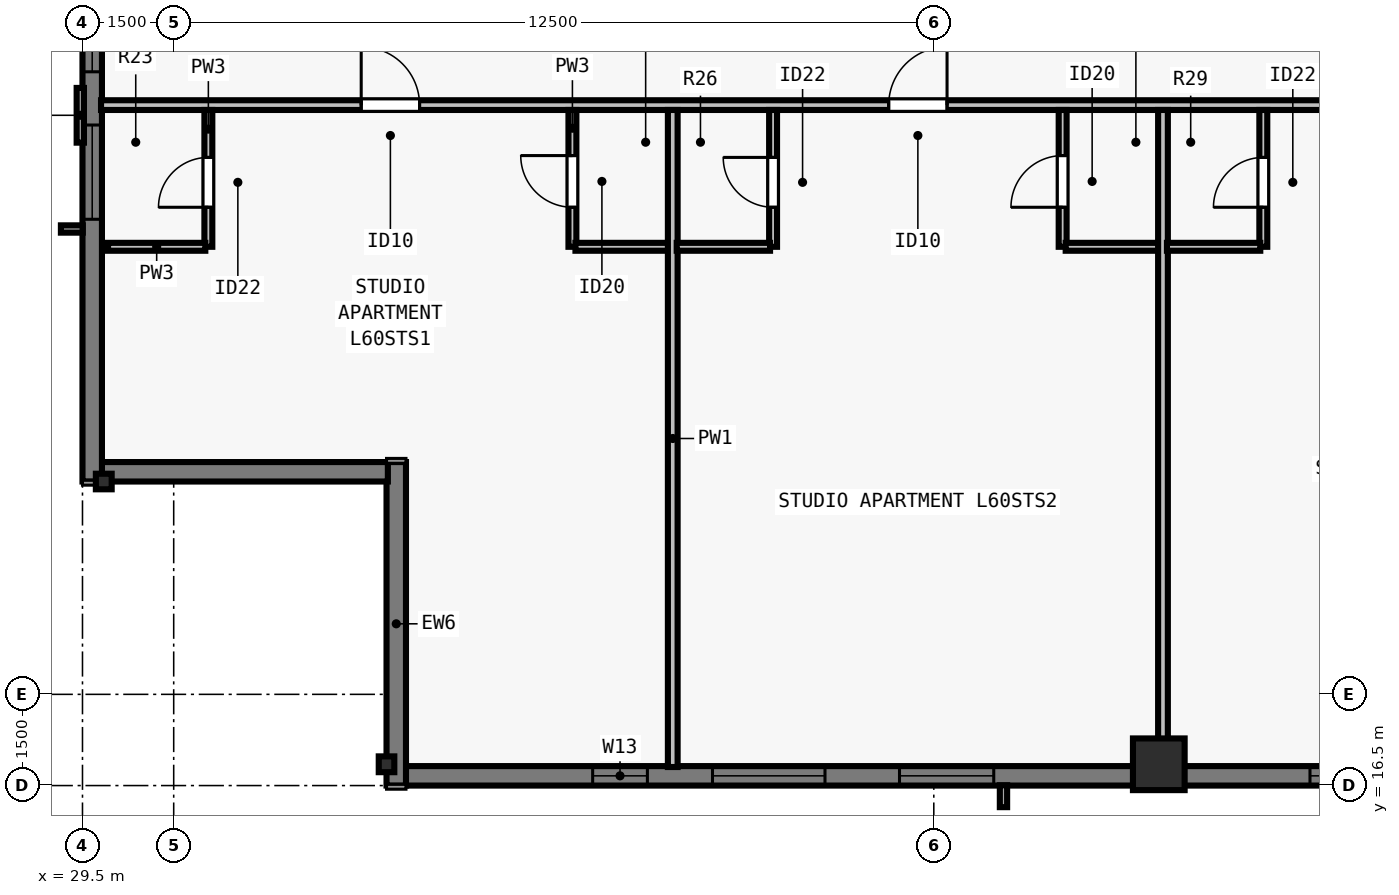
"""IFC4 building model, lengths in metres.
Left out: names, types, materials, properties, quantities, classifications, styles, units other than length and angle.
Written with IfcOpenShell. Run it as: python <this file> out.ifc"""

import sys

from ifc_helpers import new_model, si_unit, direction, frame, frame_2d, origin, origin_2d, place, context, subcontext, project, spatial, rectangle, i_section, extrude, element, fill, save


model = new_model("IFC4")
c1 = context("Model", 3, precision=1e-05, world=origin(), true_north=direction((0.0, 1.0)))
c2 = subcontext(c1, "Body", "Model", "MODEL_VIEW")
j1 = project(units=[si_unit("LENGTHUNIT", "METRE"), si_unit("PLANEANGLEUNIT", "RADIAN")], contexts=[c1])
p1 = place(None, origin())
s1 = spatial("IfcSite", under=j1, at=p1, CompositionType="ELEMENT")
p2 = place(p1, origin())
s2 = spatial("IfcBuilding", under=s1, at=p2, CompositionType="ELEMENT")
p3 = place(p2, frame((0.0, 0.0, 220.0)))
s3 = spatial("IfcBuildingStorey", under=s2, at=p3, CompositionType="ELEMENT", Elevation=220.0)
p4 = place(p3, frame((34.5, 16.85, 0.0), z_axis=(0.0, 0.0, 1.0), x_axis=(1.0, 0.0, 0.0)))
e1 = element("IfcColumn", 1, at=p4, inside=s3, PredefinedType="COLUMN", context=c2, shape_type="SweptSolid", body=[
    extrude(i_section(OverallWidth=0.256, OverallDepth=0.26, WebThickness=0.01, FlangeThickness=0.017, FilletRadius=0.013, at=origin_2d()), origin(), (0.0, 0.0, 1.0), 3.5),
])
p5 = place(p3, frame((47.2, 16.85, 0.0), z_axis=(0.0, 0.0, 1.0), x_axis=(1.0, 0.0, 0.0)))
e2 = element("IfcColumn", 2, at=p5, inside=s3, PredefinedType="COLUMN", context=c2, shape_type="SweptSolid", body=[
    extrude(rectangle(XDim=0.85, YDim=0.85, at=origin_2d()), origin(), (0.0, 0.0, 1.0), 3.5),
])
p6 = place(p3, frame((29.85, 21.5, 0.0), z_axis=(0.0, 0.0, 1.0), x_axis=(0.0, 1.0, 0.0)))
e3 = element("IfcColumn", 3, at=p6, inside=s3, PredefinedType="COLUMN", context=c2, shape_type="SweptSolid", body=[
    extrude(i_section(OverallWidth=0.256, OverallDepth=0.26, WebThickness=0.01, FlangeThickness=0.017, FilletRadius=0.013, at=origin_2d()), origin(), (0.0, 0.0, 1.0), 3.5),
])
p7 = place(p3, frame((69.5, 16.66, 0.0), z_axis=(0.0, 0.0, 1.0), x_axis=(-1.0, 0.0, 0.0)))
e4 = element("IfcWall", 4, at=p7, inside=s3, PredefinedType="SOLIDWALL", context=c2, shape_type="SweptSolid", body=[
    extrude(rectangle(XDim=34.702, YDim=0.32, at=frame_2d((17.351, 0.0))), origin(), (0.0, 0.0, 1.0), 3.29),
])
p8 = place(p7, frame((5.213, 0.0, 0.8)))
e5 = element("IfcOpeningElement", 5, at=p8, cuts=e4, PredefinedType="OPENING", context=c2, shape_type="SweptSolid", body=[
    extrude(rectangle(XDim=1.55, YDim=1.678, at=frame_2d((0.775, 0.839))), frame((0.0, 0.17, 0.0), z_axis=(0.0, -1.0, 0.0), x_axis=(1.0, 0.0, 0.0)), (0.0, 0.0, 1.0), 0.34),
])
p9 = place(p7, frame((7.988, 0.0, 0.8)))
e6 = element("IfcOpeningElement", 6, at=p9, cuts=e4, PredefinedType="OPENING", context=c2, shape_type="SweptSolid", body=[
    extrude(rectangle(XDim=1.85, YDim=1.678, at=frame_2d((0.925, 0.839))), frame((0.0, 0.17, 0.0), z_axis=(0.0, -1.0, 0.0), x_axis=(1.0, 0.0, 0.0)), (0.0, 0.0, 1.0), 0.34),
])
p10 = place(p7, frame((10.263, 0.0, 0.8)))
e7 = element("IfcOpeningElement", 7, at=p10, cuts=e4, PredefinedType="OPENING", context=c2, shape_type="SweptSolid", body=[
    extrude(rectangle(XDim=1.55, YDim=1.678, at=frame_2d((0.775, 0.839))), frame((0.0, 0.17, 0.0), z_axis=(0.0, -1.0, 0.0), x_axis=(1.0, 0.0, 0.0)), (0.0, 0.0, 1.0), 0.34),
])
p11 = place(p7, frame((14.738, 0.0, 0.8)))
e8 = element("IfcOpeningElement", 8, at=p11, cuts=e4, PredefinedType="OPENING", context=c2, shape_type="SweptSolid", body=[
    extrude(rectangle(XDim=1.85, YDim=1.678, at=frame_2d((0.925, 0.839))), frame((0.0, 0.17, 0.0), z_axis=(0.0, -1.0, 0.0), x_axis=(1.0, 0.0, 0.0)), (0.0, 0.0, 1.0), 0.34),
])
p12 = place(p7, frame((18.264, 0.0, 0.8)))
e9 = element("IfcOpeningElement", 9, at=p12, cuts=e4, PredefinedType="OPENING", context=c2, shape_type="SweptSolid", body=[
    extrude(rectangle(XDim=1.55, YDim=1.678, at=frame_2d((0.775, 0.839))), frame((0.0, 0.17, 0.0), z_axis=(0.0, -1.0, 0.0), x_axis=(1.0, 0.0, 0.0)), (0.0, 0.0, 1.0), 0.34),
])
p13 = place(p7, frame((25.014, 0.0, 0.8)))
e10 = element("IfcOpeningElement", 10, at=p13, cuts=e4, PredefinedType="OPENING", context=c2, shape_type="SweptSolid", body=[
    extrude(rectangle(XDim=1.55, YDim=1.678, at=frame_2d((0.775, 0.839))), frame((0.0, 0.17, 0.0), z_axis=(0.0, -1.0, 0.0), x_axis=(1.0, 0.0, 0.0)), (0.0, 0.0, 1.0), 0.34),
])
p14 = place(p7, frame((27.789, 0.0, 0.8)))
e11 = element("IfcOpeningElement", 11, at=p14, cuts=e4, PredefinedType="OPENING", context=c2, shape_type="SweptSolid", body=[
    extrude(rectangle(XDim=1.85, YDim=1.678, at=frame_2d((0.925, 0.839))), frame((0.0, 0.17, 0.0), z_axis=(0.0, -1.0, 0.0), x_axis=(1.0, 0.0, 0.0)), (0.0, 0.0, 1.0), 0.34),
])
p15 = place(p7, frame((30.71, 0.0, 0.8)))
e12 = element("IfcOpeningElement", 12, at=p15, cuts=e4, PredefinedType="OPENING", context=c2, shape_type="SweptSolid", body=[
    extrude(rectangle(XDim=0.9, YDim=1.678, at=frame_2d((0.45, 0.839))), frame((0.0, 0.17, 0.0), z_axis=(0.0, -1.0, 0.0), x_axis=(1.0, 0.0, 0.0)), (0.0, 0.0, 1.0), 0.34),
])
p16 = place(p3, frame((34.66, 16.5, 0.0), z_axis=(0.0, 0.0, 1.0), x_axis=(0.0, 1.0, 0.0)))
e13 = element("IfcWall", 13, at=p16, inside=s3, PredefinedType="SOLIDWALL", context=c2, shape_type="SweptSolid", body=[
    extrude(rectangle(XDim=5.32, YDim=0.32, at=frame_2d((2.66, 0.0))), origin(), (0.0, 0.0, 1.0), 3.29),
])
p17 = place(p3, frame((34.522, 21.66, 0.0), z_axis=(0.0, 0.0, 1.0), x_axis=(-1.0, 0.0, 0.0)))
e14 = element("IfcWall", 14, at=p17, inside=s3, PredefinedType="SOLIDWALL", context=c2, shape_type="SweptSolid", body=[
    extrude(rectangle(XDim=4.724, YDim=0.32, at=frame_2d((2.362, 0.0))), origin(), (0.0, 0.0, 1.0), 3.29),
])
p18 = place(p3, frame((29.66, 21.5, 0.0), z_axis=(0.0, 0.0, 1.0), x_axis=(0.0, 1.0, 0.0)))
e15 = element("IfcWall", 15, at=p18, inside=s3, PredefinedType="SOLIDWALL", context=c2, shape_type="SweptSolid", body=[
    extrude(rectangle(XDim=34.702, YDim=0.32, at=frame_2d((17.351, 0.0))), origin(), (0.0, 0.0, 1.0), 3.29),
])
p19 = place(p18, frame((4.312, 0.0, 0.8)))
e16 = element("IfcOpeningElement", 16, at=p19, cuts=e15, PredefinedType="OPENING", context=c2, shape_type="SweptSolid", body=[
    extrude(rectangle(XDim=1.55, YDim=1.678, at=frame_2d((0.775, 0.839))), frame((0.0, 0.17, 0.0), z_axis=(0.0, -1.0, 0.0), x_axis=(1.0, 0.0, 0.0)), (0.0, 0.0, 1.0), 0.34),
])
p20 = place(p18, frame((6.738, 0.0, 0.8)))
e17 = element("IfcOpeningElement", 17, at=p20, cuts=e15, PredefinedType="OPENING", context=c2, shape_type="SweptSolid", body=[
    extrude(rectangle(XDim=1.85, YDim=1.678, at=frame_2d((0.925, 0.839))), frame((0.0, 0.17, 0.0), z_axis=(0.0, -1.0, 0.0), x_axis=(1.0, 0.0, 0.0)), (0.0, 0.0, 1.0), 0.34),
])
p21 = place(p18, frame((10.263, 0.0, 0.8)))
e18 = element("IfcOpeningElement", 18, at=p21, cuts=e15, PredefinedType="OPENING", context=c2, shape_type="SweptSolid", body=[
    extrude(rectangle(XDim=1.55, YDim=1.678, at=frame_2d((0.775, 0.839))), frame((0.0, 0.17, 0.0), z_axis=(0.0, -1.0, 0.0), x_axis=(1.0, 0.0, 0.0)), (0.0, 0.0, 1.0), 0.34),
])
p22 = place(p18, frame((14.738, 0.0, 0.8)))
e19 = element("IfcOpeningElement", 19, at=p22, cuts=e15, PredefinedType="OPENING", context=c2, shape_type="SweptSolid", body=[
    extrude(rectangle(XDim=1.85, YDim=1.678, at=frame_2d((0.925, 0.839))), frame((0.0, 0.17, 0.0), z_axis=(0.0, -1.0, 0.0), x_axis=(1.0, 0.0, 0.0)), (0.0, 0.0, 1.0), 0.34),
])
p23 = place(p18, frame((18.264, 0.0, 0.8)))
e20 = element("IfcOpeningElement", 20, at=p23, cuts=e15, PredefinedType="OPENING", context=c2, shape_type="SweptSolid", body=[
    extrude(rectangle(XDim=1.55, YDim=1.678, at=frame_2d((0.775, 0.839))), frame((0.0, 0.17, 0.0), z_axis=(0.0, -1.0, 0.0), x_axis=(1.0, 0.0, 0.0)), (0.0, 0.0, 1.0), 0.34),
])
p24 = place(p18, frame((24.164, 0.0, 0.8)))
e21 = element("IfcOpeningElement", 21, at=p24, cuts=e15, PredefinedType="OPENING", context=c2, shape_type="SweptSolid", body=[
    extrude(rectangle(XDim=1.55, YDim=1.678, at=frame_2d((0.775, 0.839))), frame((0.0, 0.17, 0.0), z_axis=(0.0, -1.0, 0.0), x_axis=(1.0, 0.0, 0.0)), (0.0, 0.0, 1.0), 0.34),
])
p25 = place(p3, frame((29.805, 27.69, 0.0), z_axis=(0.0, 0.0, 1.0), x_axis=(1.0, 0.0, 0.0)))
e22 = element("IfcWall", 22, at=p25, inside=s3, PredefinedType="PARTITIONING", context=c2, shape_type="SweptSolid", body=[
    extrude(rectangle(XDim=44.39, YDim=0.16, at=frame_2d((22.195, 0.0))), origin(), (0.0, 0.0, 1.0), 2.958),
])
p26 = place(p25, frame((4.279, 0.0, 0.0)))
e23 = element("IfcOpeningElement", 23, at=p26, cuts=e22, PredefinedType="OPENING", context=c2, shape_type="SweptSolid", body=[
    extrude(rectangle(XDim=0.96, YDim=2.18, at=frame_2d((0.48, 1.09))), frame((0.0, 0.09, 0.0), z_axis=(0.0, -1.0, 0.0), x_axis=(1.0, 0.0, 0.0)), (0.0, 0.0, 1.0), 0.18),
])
p27 = place(p25, frame((12.953, 0.0, 0.0)))
e24 = element("IfcOpeningElement", 24, at=p27, cuts=e22, PredefinedType="OPENING", context=c2, shape_type="SweptSolid", body=[
    extrude(rectangle(XDim=0.96, YDim=2.18, at=frame_2d((0.48, 1.09))), frame((0.0, 0.09, 0.0), z_axis=(0.0, -1.0, 0.0), x_axis=(1.0, 0.0, 0.0)), (0.0, 0.0, 1.0), 0.18),
])
p28 = place(p25, frame((21.785, 0.0, 0.0)))
e25 = element("IfcOpeningElement", 25, at=p28, cuts=e22, PredefinedType="OPENING", context=c2, shape_type="SweptSolid", body=[
    extrude(rectangle(XDim=0.96, YDim=2.18, at=frame_2d((0.48, 1.09))), frame((0.0, 0.09, 0.0), z_axis=(0.0, -1.0, 0.0), x_axis=(1.0, 0.0, 0.0)), (0.0, 0.0, 1.0), 0.18),
])
p29 = place(p25, frame((30.617, 0.0, 0.0)))
e26 = element("IfcOpeningElement", 26, at=p29, cuts=e22, PredefinedType="OPENING", context=c2, shape_type="SweptSolid", body=[
    extrude(rectangle(XDim=0.96, YDim=2.18, at=frame_2d((0.48, 1.09))), frame((0.0, 0.09, 0.0), z_axis=(0.0, -1.0, 0.0), x_axis=(1.0, 0.0, 0.0)), (0.0, 0.0, 1.0), 0.18),
])
p30 = place(p25, frame((39.221, 0.0, 0.0)))
e27 = element("IfcOpeningElement", 27, at=p30, cuts=e22, PredefinedType="OPENING", context=c2, shape_type="SweptSolid", body=[
    extrude(rectangle(XDim=0.96, YDim=2.18, at=frame_2d((0.48, 1.09))), frame((0.0, 0.09, 0.0), z_axis=(0.0, -1.0, 0.0), x_axis=(1.0, 0.0, 0.0)), (0.0, 0.0, 1.0), 0.18),
])
p31 = place(p3, frame((31.57, 25.36, 0.0), z_axis=(0.0, 0.0, 1.0), x_axis=(0.0, 1.0, 0.0)))
e28 = element("IfcWall", 28, at=p31, inside=s3, PredefinedType="PLUMBINGWALL", context=c2, shape_type="SweptSolid", body=[
    extrude(rectangle(XDim=2.25, YDim=0.13, at=frame_2d((1.125, 0.0))), origin(), (0.0, 0.0, 1.0), 3.29),
])
p32 = place(p31, frame((0.65, 0.0, 0.0)))
e29 = element("IfcOpeningElement", 29, at=p32, cuts=e28, PredefinedType="OPENING", context=c2, shape_type="SweptSolid", body=[
    extrude(rectangle(XDim=0.82, YDim=2.1, at=frame_2d((0.41, 1.05))), frame((0.0, 0.075, 0.0), z_axis=(0.0, -1.0, 0.0), x_axis=(1.0, 0.0, 0.0)), (0.0, 0.0, 1.0), 0.15),
])
p33 = place(p3, frame((29.92, 25.36, 0.0), z_axis=(0.0, 0.0, 1.0), x_axis=(1.0, 0.0, 0.0)))
e30 = element("IfcWall", 30, at=p33, inside=s3, PredefinedType="PLUMBINGWALL", context=c2, shape_type="SweptSolid", body=[
    extrude(rectangle(XDim=1.6, YDim=0.13, at=frame_2d((0.8, 0.0))), origin(), (0.0, 0.0, 1.0), 3.29),
])
p34 = place(p3, frame((37.557, 25.36, 0.0), z_axis=(0.0, 0.0, 1.0), x_axis=(0.0, 1.0, 0.0)))
e31 = element("IfcWall", 31, at=p34, inside=s3, PredefinedType="PLUMBINGWALL", context=c2, shape_type="SweptSolid", body=[
    extrude(rectangle(XDim=2.25, YDim=0.13, at=frame_2d((1.125, 0.0))), origin(), (0.0, 0.0, 1.0), 3.29),
])
p35 = place(p34, frame((0.65, 0.0, 0.0)))
e32 = element("IfcOpeningElement", 32, at=p35, cuts=e31, PredefinedType="OPENING", context=c2, shape_type="SweptSolid", body=[
    extrude(rectangle(XDim=0.85, YDim=2.1, at=frame_2d((0.425, 1.05))), frame((0.0, 0.075, 0.0), z_axis=(0.0, -1.0, 0.0), x_axis=(1.0, 0.0, 0.0)), (0.0, 0.0, 1.0), 0.15),
])
p36 = place(p3, frame((37.607, 25.36, 0.0), z_axis=(0.0, 0.0, 1.0), x_axis=(1.0, 0.0, 0.0)))
e33 = element("IfcWall", 33, at=p36, inside=s3, PredefinedType="PLUMBINGWALL", context=c2, shape_type="SweptSolid", body=[
    extrude(rectangle(XDim=1.6, YDim=0.13, at=frame_2d((0.8, 0.0))), origin(), (0.0, 0.0, 1.0), 3.29),
])
p37 = place(p3, frame((39.207, 16.805, 0.0), z_axis=(0.0, 0.0, 1.0), x_axis=(0.0, 1.0, 0.0)))
e34 = element("IfcWall", 34, at=p37, inside=s3, PredefinedType="PARTITIONING", context=c2, shape_type="SweptSolid", body=[
    extrude(rectangle(XDim=10.805, YDim=0.16, at=frame_2d((5.403, 0.0))), origin(), (0.0, 0.0, 1.0), 2.573),
])
p38 = place(p3, frame((40.857, 25.36, 0.0), z_axis=(0.0, 0.0, 1.0), x_axis=(0.0, 1.0, 0.0)))
e35 = element("IfcWall", 35, at=p38, inside=s3, PredefinedType="PLUMBINGWALL", context=c2, shape_type="SweptSolid", body=[
    extrude(rectangle(XDim=2.25, YDim=0.13, at=frame_2d((1.125, 0.0))), origin(), (0.0, 0.0, 1.0), 2.573),
])
p39 = place(p38, frame((0.65, 0.0, 0.0)))
e36 = element("IfcOpeningElement", 36, at=p39, cuts=e35, PredefinedType="OPENING", context=c2, shape_type="SweptSolid", body=[
    extrude(rectangle(XDim=0.82, YDim=2.1, at=frame_2d((0.41, 1.05))), frame((0.0, 0.075, 0.0), z_axis=(0.0, -1.0, 0.0), x_axis=(1.0, 0.0, 0.0)), (0.0, 0.0, 1.0), 0.15),
])
p40 = place(p3, frame((39.272, 25.36, 0.0), z_axis=(0.0, 0.0, 1.0), x_axis=(1.0, 0.0, 0.0)))
e37 = element("IfcWall", 37, at=p40, inside=s3, PredefinedType="PLUMBINGWALL", context=c2, shape_type="SweptSolid", body=[
    extrude(rectangle(XDim=1.535, YDim=0.13, at=frame_2d((0.768, 0.0))), origin(), (0.0, 0.0, 1.0), 3.29),
])
p41 = place(p3, frame((45.619, 25.36, 0.0), z_axis=(0.0, 0.0, 1.0), x_axis=(0.0, 1.0, 0.0)))
e38 = element("IfcWall", 38, at=p41, inside=s3, PredefinedType="PLUMBINGWALL", context=c2, shape_type="SweptSolid", body=[
    extrude(rectangle(XDim=2.25, YDim=0.13, at=frame_2d((1.125, 0.0))), origin(), (0.0, 0.0, 1.0), 3.29),
])
p42 = place(p41, frame((0.65, 0.0, 0.0)))
e39 = element("IfcOpeningElement", 39, at=p42, cuts=e38, PredefinedType="OPENING", context=c2, shape_type="SweptSolid", body=[
    extrude(rectangle(XDim=0.85, YDim=2.1, at=frame_2d((0.425, 1.05))), frame((0.0, 0.075, 0.0), z_axis=(0.0, -1.0, 0.0), x_axis=(1.0, 0.0, 0.0)), (0.0, 0.0, 1.0), 0.15),
])
p43 = place(p3, frame((45.669, 25.36, 0.0), z_axis=(0.0, 0.0, 1.0), x_axis=(1.0, 0.0, 0.0)))
e40 = element("IfcWall", 40, at=p43, inside=s3, PredefinedType="PLUMBINGWALL", context=c2, shape_type="SweptSolid", body=[
    extrude(rectangle(XDim=1.6, YDim=0.13, at=frame_2d((0.8, 0.0))), origin(), (0.0, 0.0, 1.0), 3.29),
])
p44 = place(p3, frame((47.269, 16.805, 0.0), z_axis=(0.0, 0.0, 1.0), x_axis=(0.0, 1.0, 0.0)))
e41 = element("IfcWall", 41, at=p44, inside=s3, PredefinedType="PARTITIONING", context=c2, shape_type="SweptSolid", body=[
    extrude(rectangle(XDim=10.805, YDim=0.16, at=frame_2d((5.403, 0.0))), origin(), (0.0, 0.0, 1.0), 2.573),
])
p45 = place(p3, frame((48.919, 25.36, 0.0), z_axis=(0.0, 0.0, 1.0), x_axis=(0.0, 1.0, 0.0)))
e42 = element("IfcWall", 42, at=p45, inside=s3, PredefinedType="PLUMBINGWALL", context=c2, shape_type="SweptSolid", body=[
    extrude(rectangle(XDim=2.25, YDim=0.13, at=frame_2d((1.125, 0.0))), origin(), (0.0, 0.0, 1.0), 3.29),
])
p46 = place(p45, frame((0.65, 0.0, 0.0)))
e43 = element("IfcOpeningElement", 43, at=p46, cuts=e42, PredefinedType="OPENING", context=c2, shape_type="SweptSolid", body=[
    extrude(rectangle(XDim=0.82, YDim=2.1, at=frame_2d((0.41, 1.05))), frame((0.0, 0.075, 0.0), z_axis=(0.0, -1.0, 0.0), x_axis=(1.0, 0.0, 0.0)), (0.0, 0.0, 1.0), 0.15),
])
p47 = place(p3, frame((47.334, 25.36, 0.0), z_axis=(0.0, 0.0, 1.0), x_axis=(1.0, 0.0, 0.0)))
e44 = element("IfcWall", 44, at=p47, inside=s3, PredefinedType="PLUMBINGWALL", context=c2, shape_type="SweptSolid", body=[
    extrude(rectangle(XDim=1.535, YDim=0.13, at=frame_2d((0.768, 0.0))), origin(), (0.0, 0.0, 1.0), 3.29),
])
p48 = place(p12, origin())
e45 = element("IfcWindow", 45, at=p48, inside=s3, PartitioningType="SINGLE_PANEL", PredefinedType="WINDOW", context=c2, shape_type="SweptSolid", body=[
    extrude(rectangle(XDim=1.55, YDim=1.678, at=frame_2d((0.775, 0.839))), frame((0.0, -0.05, 0.0), z_axis=(0.0, -1.0, 0.0), x_axis=(1.0, 0.0, 0.0)), (0.0, 0.0, 1.0), 0.06),
])
fill(e9, e45)
p49 = place(p13, origin())
e46 = element("IfcWindow", 46, at=p49, inside=s3, PartitioningType="SINGLE_PANEL", PredefinedType="WINDOW", context=c2, shape_type="SweptSolid", body=[
    extrude(rectangle(XDim=1.55, YDim=1.678, at=frame_2d((0.775, 0.839))), frame((0.0, -0.05, 0.0), z_axis=(0.0, -1.0, 0.0), x_axis=(1.0, 0.0, 0.0)), (0.0, 0.0, 1.0), 0.06),
])
fill(e10, e46)
p50 = place(p14, origin())
e47 = element("IfcWindow", 47, at=p50, inside=s3, PartitioningType="SINGLE_PANEL", PredefinedType="WINDOW", context=c2, shape_type="SweptSolid", body=[
    extrude(rectangle(XDim=1.85, YDim=1.678, at=frame_2d((0.925, 0.839))), frame((0.0, -0.05, 0.0), z_axis=(0.0, -1.0, 0.0), x_axis=(1.0, 0.0, 0.0)), (0.0, 0.0, 1.0), 0.06),
])
fill(e11, e47)
p51 = place(p19, origin())
e48 = element("IfcWindow", 48, at=p51, inside=s3, PartitioningType="SINGLE_PANEL", PredefinedType="WINDOW", context=c2, shape_type="SweptSolid", body=[
    extrude(rectangle(XDim=1.55, YDim=1.678, at=frame_2d((0.775, 0.839))), frame((0.0, -0.05, 0.0), z_axis=(0.0, -1.0, 0.0), x_axis=(1.0, 0.0, 0.0)), (0.0, 0.0, 1.0), 0.06),
])
fill(e16, e48)
p52 = place(p20, origin())
e49 = element("IfcWindow", 49, at=p52, inside=s3, PartitioningType="SINGLE_PANEL", PredefinedType="WINDOW", context=c2, shape_type="SweptSolid", body=[
    extrude(rectangle(XDim=1.85, YDim=1.678, at=frame_2d((0.925, 0.839))), frame((0.0, -0.05, 0.0), z_axis=(0.0, -1.0, 0.0), x_axis=(1.0, 0.0, 0.0)), (0.0, 0.0, 1.0), 0.06),
])
fill(e17, e49)
p53 = place(p15, origin())
e50 = element("IfcWindow", 50, at=p53, inside=s3, PartitioningType="SINGLE_PANEL", PredefinedType="WINDOW", context=c2, shape_type="SweptSolid", body=[
    extrude(rectangle(XDim=0.9, YDim=1.678, at=frame_2d((0.45, 0.839))), frame((0.0, -0.04, 0.0), z_axis=(0.0, -1.0, 0.0), x_axis=(1.0, 0.0, 0.0)), (0.0, 0.0, 1.0), 0.06),
])
fill(e12, e50)
p54 = place(p32, origin())
e51 = element("IfcDoor", 51, at=p54, inside=s3, OperationType="SINGLE_SWING_LEFT", PredefinedType="DOOR", context=c2, shape_type="SweptSolid", body=[
    extrude(rectangle(XDim=0.82, YDim=2.1, at=frame_2d((0.41, 1.05))), frame((0.0, 0.025, 0.0), z_axis=(0.0, -1.0, 0.0), x_axis=(1.0, 0.0, 0.0)), (0.0, 0.0, 1.0), 0.05),
])
fill(e29, e51)
p55 = place(p35, origin())
e52 = element("IfcDoor", 52, at=p55, inside=s3, OperationType="SINGLE_SWING_RIGHT", PredefinedType="DOOR", context=c2, shape_type="SweptSolid", body=[
    extrude(rectangle(XDim=0.85, YDim=2.1, at=frame_2d((0.425, 1.05))), frame((0.0, 0.025, 0.0), z_axis=(0.0, -1.0, 0.0), x_axis=(1.0, 0.0, 0.0)), (0.0, 0.0, 1.0), 0.05),
])
fill(e32, e52)
p56 = place(p26, origin())
e53 = element("IfcDoor", 53, at=p56, inside=s3, OperationType="SINGLE_SWING_LEFT", PredefinedType="DOOR", context=c2, shape_type="SweptSolid", body=[
    extrude(rectangle(XDim=0.96, YDim=2.18, at=frame_2d((0.48, 1.09))), frame((0.0, 0.025, 0.0), z_axis=(0.0, -1.0, 0.0), x_axis=(1.0, 0.0, 0.0)), (0.0, 0.0, 1.0), 0.05),
])
fill(e23, e53)
p57 = place(p39, origin())
e54 = element("IfcDoor", 54, at=p57, inside=s3, OperationType="SINGLE_SWING_RIGHT", PredefinedType="DOOR", context=c2, shape_type="SweptSolid", body=[
    extrude(rectangle(XDim=0.82, YDim=2.1, at=frame_2d((0.41, 1.05))), frame((0.0, 0.025, 0.0), z_axis=(0.0, -1.0, 0.0), x_axis=(1.0, 0.0, 0.0)), (0.0, 0.0, 1.0), 0.05),
])
fill(e36, e54)
p58 = place(p42, origin())
e55 = element("IfcDoor", 55, at=p58, inside=s3, OperationType="SINGLE_SWING_LEFT", PredefinedType="DOOR", context=c2, shape_type="SweptSolid", body=[
    extrude(rectangle(XDim=0.85, YDim=2.1, at=frame_2d((0.425, 1.05))), frame((0.0, 0.025, 0.0), z_axis=(0.0, -1.0, 0.0), x_axis=(1.0, 0.0, 0.0)), (0.0, 0.0, 1.0), 0.05),
])
fill(e39, e55)
p59 = place(p27, origin())
e56 = element("IfcDoor", 56, at=p59, inside=s3, OperationType="SINGLE_SWING_RIGHT", PredefinedType="DOOR", context=c2, shape_type="SweptSolid", body=[
    extrude(rectangle(XDim=0.96, YDim=2.18, at=frame_2d((0.48, 1.09))), frame((0.0, 0.025, 0.0), z_axis=(0.0, -1.0, 0.0), x_axis=(1.0, 0.0, 0.0)), (0.0, 0.0, 1.0), 0.05),
])
fill(e24, e56)
p60 = place(p46, origin())
e57 = element("IfcDoor", 57, at=p60, inside=s3, OperationType="SINGLE_SWING_LEFT", PredefinedType="DOOR", context=c2, shape_type="SweptSolid", body=[
    extrude(rectangle(XDim=0.82, YDim=2.1, at=frame_2d((0.41, 1.05))), frame((0.0, 0.025, 0.0), z_axis=(0.0, -1.0, 0.0), x_axis=(1.0, 0.0, 0.0)), (0.0, 0.0, 1.0), 0.05),
])
fill(e43, e57)
save(model, sys.argv[1])
